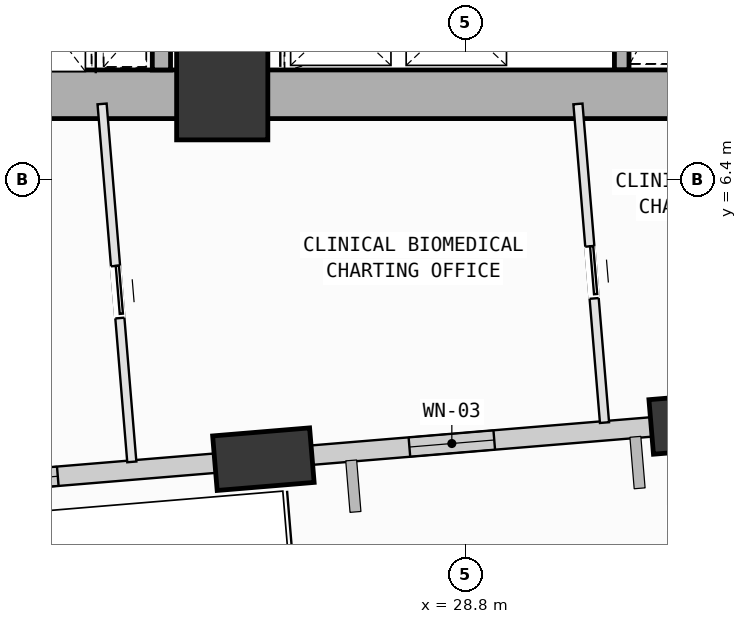
"""IFC4 building model, lengths in metres.
Left out: names, types, materials, properties, quantities, classifications, styles, units other than length and angle.
Written with IfcOpenShell. Run it as: python <this file> out.ifc"""

import sys

from ifc_helpers import new_model, si_unit, direction, frame, frame_2d, origin, origin_2d, place, context, subcontext, project, spatial, rectangle, extrude, element, fill, save


model = new_model("IFC4")
c1 = context("Model", 3, precision=1e-05, world=origin(), true_north=direction((0.0, 1.0)))
c2 = subcontext(c1, "Body", "Model", "MODEL_VIEW")
j1 = project(units=[si_unit("LENGTHUNIT", "METRE"), si_unit("PLANEANGLEUNIT", "RADIAN")], contexts=[c1])
p1 = place(None, origin())
s1 = spatial("IfcSite", under=j1, at=p1, CompositionType="ELEMENT")
p2 = place(p1, origin())
s2 = spatial("IfcBuilding", under=s1, at=p2, CompositionType="ELEMENT")
p3 = place(p2, frame((0.0, 0.0, 43.0)))
s3 = spatial("IfcBuildingStorey", under=s2, at=p3, CompositionType="ELEMENT", Elevation=43.0)
p4 = place(p3, frame((24.8, 7.8, 0.0), z_axis=(0.0, 0.0, 1.0), x_axis=(1.0, 0.0, 0.0)))
e1 = element("IfcColumn", 1, at=p4, inside=s3, PredefinedType="COLUMN", context=c2, shape_type="SweptSolid", body=[
    extrude(rectangle(XDim=1.5, YDim=1.5, at=origin_2d()), origin(), (0.0, 0.0, 1.0), 4.0),
])
p5 = place(p3, frame((25.477, 1.798, 0.002), z_axis=(0.095116908287, -0.032698336523, 0.994928938441), x_axis=(0.24606709674, 0.969217010623, 0.008328878761)))
e2 = element("IfcColumn", 2, at=p5, inside=s3, PredefinedType="COLUMN", context=c2, shape_type="SweptSolid", body=[
    extrude(rectangle(XDim=1.6, YDim=0.9, at=origin_2d()), origin(), (0.0, 0.0, 1.0), 4.017),
])
p6 = place(p3, frame((25.061, 1.764, 0.0), z_axis=(0.0, 0.0, 1.0), x_axis=(-0.996565913444, -0.082803261775, 0.0)))
e3 = element("IfcWall", 3, at=p6, inside=s3, PredefinedType="SOLIDWALL", context=c2, shape_type="SweptSolid", body=[
    extrude(rectangle(XDim=6.006, YDim=0.32, at=frame_2d((3.003, 0.0))), origin(), (0.0, 0.0, 1.0), 3.165),
])
p7 = place(p6, frame((2.976, 0.0, 0.75)))
e4 = element("IfcOpeningElement", 4, at=p7, cuts=e3, PredefinedType="OPENING", context=c2, shape_type="SweptSolid", body=[
    extrude(rectangle(XDim=2.0, YDim=1.95, at=frame_2d((1.0, 0.975))), frame((0.0, 0.17, 0.0), z_axis=(0.0, -1.0, 0.0), x_axis=(1.0, 0.0, 0.0)), (0.0, 0.0, 1.0), 0.34),
])
p8 = place(p3, frame((32.231, 2.36, 0.0), z_axis=(0.0, 0.0, 1.0), x_axis=(-0.996564006264, -0.082826212145, 0.0)))
e5 = element("IfcWall", 5, at=p8, inside=s3, PredefinedType="SOLIDWALL", context=c2, shape_type="SweptSolid", body=[
    extrude(rectangle(XDim=5.99, YDim=0.32, at=frame_2d((2.995, 0.0))), origin(), (0.0, 0.0, 1.0), 3.165),
])
p9 = place(p8, frame((2.967, 0.0, 0.75)))
e6 = element("IfcOpeningElement", 6, at=p9, cuts=e5, PredefinedType="OPENING", context=c2, shape_type="SweptSolid", body=[
    extrude(rectangle(XDim=1.4, YDim=1.85, at=frame_2d((0.7, 0.925))), frame((0.0, 0.17, 0.0), z_axis=(0.0, -1.0, 0.0), x_axis=(1.0, 0.0, 0.0)), (0.0, 0.0, 1.0), 0.34),
])
p10 = place(p3, frame((31.37, 8.2, 0.0), z_axis=(0.0, 0.0, 1.0), x_axis=(0.0, 1.0, 0.0)))
e7 = element("IfcWall", 7, at=p10, inside=s3, PredefinedType="SOLIDWALL", context=c2, shape_type="SweptSolid", body=[
    extrude(rectangle(XDim=6.92, YDim=0.24, at=frame_2d((3.46, 0.0))), origin(), (0.0, 0.0, 1.0), 3.78),
])
for number, where, z_axis, x_axis in (
    (8, (14.0, 7.8, 0.0), (0.0, 0.0, 1.0), (1.0, 0.0, 0.0)),
    (9, (24.8, 7.8, 0.0), (0.0, 0.0, 1.0), (1.0, 0.0, 0.0)),
):
    element("IfcWall", number, at=place(p3, frame(where, z_axis=z_axis, x_axis=x_axis)), inside=s3, PredefinedType="SHEAR", context=c2, shape_type="SweptSolid", body=[
        extrude(rectangle(XDim=10.8, YDim=0.8, at=frame_2d((5.4, 0.0))), origin(), (0.0, 0.0, 1.0), 3.78),
    ])
p11 = place(p3, frame((23.8, 8.2, 0.0), z_axis=(0.0, 0.0, 1.0), x_axis=(0.0, 1.0, 0.0)))
e10 = element("IfcWall", 10, at=p11, inside=s3, PredefinedType="SOLIDWALL", context=c2, shape_type="SweptSolid", body=[
    extrude(rectangle(XDim=2.48, YDim=0.3, at=frame_2d((1.24, 0.0))), origin(), (0.0, 0.0, 1.0), 3.78),
])
p12 = place(p3, frame((22.824, 7.641, 0.0), z_axis=(0.0, 0.0, 1.0), x_axis=(0.082778701645, -0.996567953806, 0.0)))
e11 = element("IfcWall", 11, at=p12, inside=s3, PredefinedType="PARTITIONING", context=c2, shape_type="SweptSolid", body=[
    extrude(rectangle(XDim=5.907, YDim=0.15, at=frame_2d((2.954, 0.0))), origin(), (0.0, 0.0, 1.0), 3.78),
])
p13 = place(p12, frame((2.674, 0.0, 0.0)))
e12 = element("IfcOpeningElement", 12, at=p13, cuts=e11, PredefinedType="OPENING", context=c2, shape_type="SweptSolid", body=[
    extrude(rectangle(XDim=0.86, YDim=2.06, at=frame_2d((0.43, 1.03))), frame((0.0, 0.085, 0.0), z_axis=(0.0, -1.0, 0.0), x_axis=(1.0, 0.0, 0.0)), (0.0, 0.0, 1.0), 0.17),
])
p14 = place(p3, frame((26.281, 1.635, 0.0), z_axis=(0.0, 0.0, 1.0), x_axis=(-0.996544360926, -0.083062245981, 0.0)))
e13 = element("IfcWall", 13, at=p14, inside=s3, PredefinedType="PARTITIONING", context=c2, shape_type="SweptSolid", body=[
    extrude(rectangle(XDim=1.205, YDim=0.15, at=frame_2d((0.603, 0.0))), origin(), (0.0, 0.0, 1.0), 3.165),
])
p15 = place(p3, frame((30.65, 7.641, 0.0), z_axis=(0.0, 0.0, 1.0), x_axis=(0.083091579505, -0.996541915534, 0.0)))
e14 = element("IfcWall", 14, at=p15, inside=s3, PredefinedType="PARTITIONING", context=c2, shape_type="SweptSolid", body=[
    extrude(rectangle(XDim=5.259, YDim=0.15, at=frame_2d((2.63, 0.0))), origin(), (0.0, 0.0, 1.0), 3.78),
])
p16 = place(p15, frame((2.35, 0.0, 0.0)))
e15 = element("IfcOpeningElement", 15, at=p16, cuts=e14, PredefinedType="OPENING", context=c2, shape_type="SweptSolid", body=[
    extrude(rectangle(XDim=0.86, YDim=2.06, at=frame_2d((0.43, 1.03))), frame((0.0, 0.085, 0.0), z_axis=(0.0, -1.0, 0.0), x_axis=(1.0, 0.0, 0.0)), (0.0, 0.0, 1.0), 0.17),
])
p17 = place(p7, origin())
e16 = element("IfcWindow", 16, at=p17, inside=s3, PartitioningType="SINGLE_PANEL", PredefinedType="WINDOW", context=c2, shape_type="SweptSolid", body=[
    extrude(rectangle(XDim=2.0, YDim=1.95, at=frame_2d((1.0, 0.975))), frame((0.0, 0.03, 0.0), z_axis=(0.0, -1.0, 0.0), x_axis=(1.0, 0.0, 0.0)), (0.0, 0.0, 1.0), 0.06),
])
fill(e4, e16)
p18 = place(p9, origin())
e17 = element("IfcWindow", 17, at=p18, inside=s3, PartitioningType="SINGLE_PANEL", PredefinedType="WINDOW", context=c2, shape_type="SweptSolid", body=[
    extrude(rectangle(XDim=1.4, YDim=1.85, at=frame_2d((0.7, 0.925))), frame((0.0, 0.03, 0.0), z_axis=(0.0, -1.0, 0.0), x_axis=(1.0, 0.0, 0.0)), (0.0, 0.0, 1.0), 0.06),
])
fill(e6, e17)
p19 = place(p16, origin())
e18 = element("IfcDoor", 18, at=p19, inside=s3, OperationType="SLIDING_TO_LEFT", PredefinedType="DOOR", context=c2, shape_type="SweptSolid", body=[
    extrude(rectangle(XDim=0.86, YDim=2.06, at=frame_2d((0.43, 1.03))), frame((0.0, 0.025, 0.0), z_axis=(0.0, -1.0, 0.0), x_axis=(1.0, 0.0, 0.0)), (0.0, 0.0, 1.0), 0.05),
])
fill(e15, e18)
p20 = place(p13, origin())
e19 = element("IfcDoor", 19, at=p20, inside=s3, OperationType="SLIDING_TO_LEFT", PredefinedType="DOOR", context=c2, shape_type="SweptSolid", body=[
    extrude(rectangle(XDim=0.86, YDim=2.06, at=frame_2d((0.43, 1.03))), frame((0.0, 0.025, 0.0), z_axis=(0.0, -1.0, 0.0), x_axis=(1.0, 0.0, 0.0)), (0.0, 0.0, 1.0), 0.05),
])
fill(e12, e19)
save(model, sys.argv[1])
